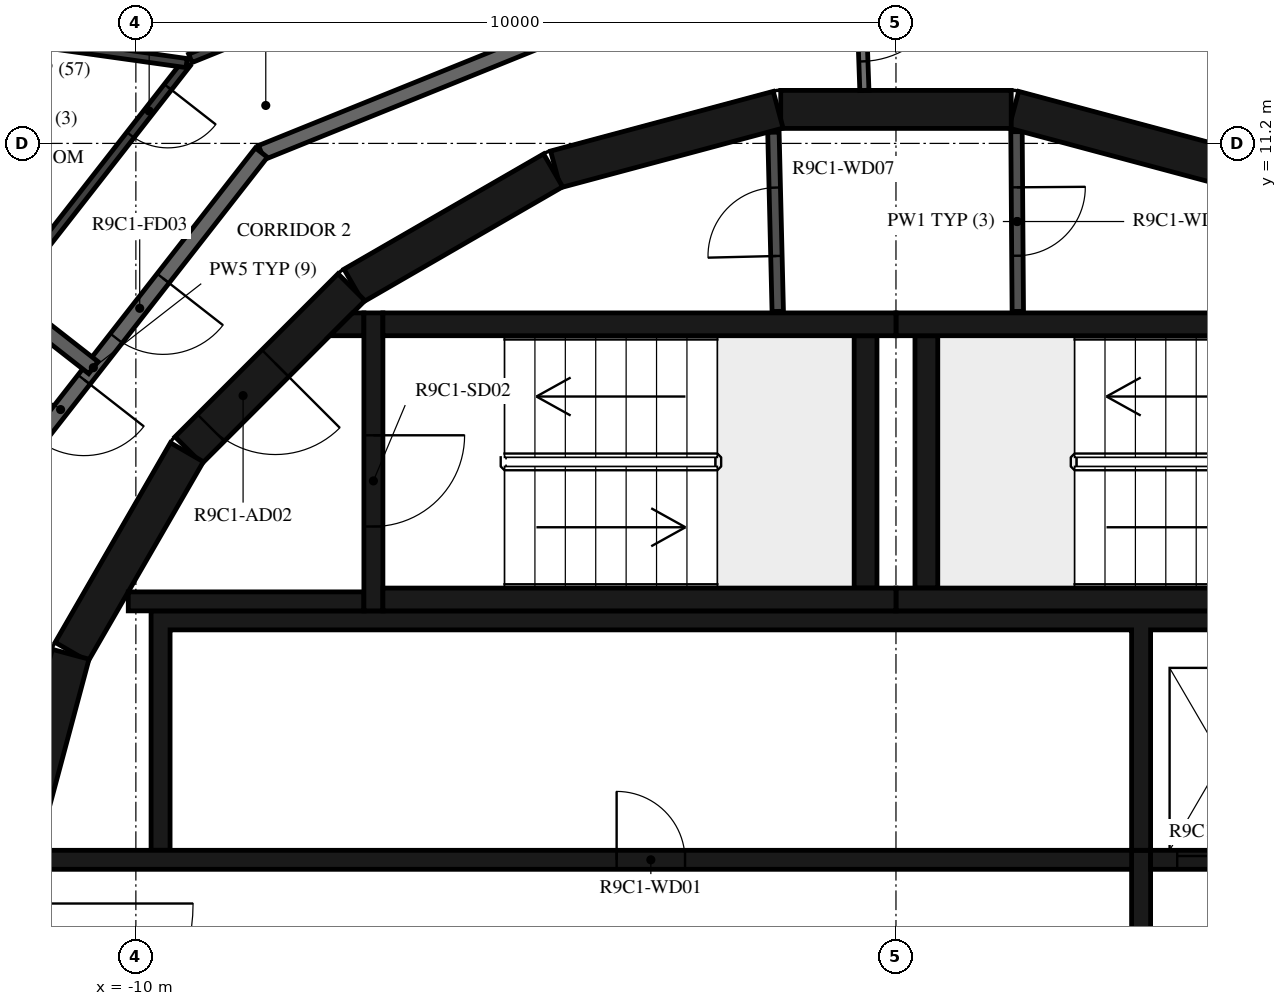
"""IFC4 building model, lengths in metres.
Left out: names, types, materials, properties, quantities, classifications, styles, units other than length and angle.
Written with IfcOpenShell. Run it as: python <this file> out.ifc"""

import sys

from ifc_helpers import new_model, si_unit, direction, frame, frame_2d, origin, place, context, subcontext, project, spatial, polyline, rectangle, outline, extrude, element, fill, save


model = new_model("IFC4")
c1 = context("Model", 3, precision=1e-05, world=origin(), true_north=direction((0.0, 1.0)))
c2 = subcontext(c1, "Body", "Model", "MODEL_VIEW")
j1 = project(units=[si_unit("LENGTHUNIT", "METRE"), si_unit("PLANEANGLEUNIT", "RADIAN")], contexts=[c1])
p1 = place(None, origin())
s1 = spatial("IfcSite", under=j1, at=p1, CompositionType="ELEMENT")
p2 = place(p1, origin())
s2 = spatial("IfcBuilding", under=s1, at=p2, CompositionType="ELEMENT")
p3 = place(p2, frame((0.0, 0.0, 357.5)))
s3 = spatial("IfcBuildingStorey", under=s2, at=p3, CompositionType="ELEMENT", Elevation=357.5)
for number, where, z_axis, x_axis in (
    (1, (4.479, 10.858, 0.0), (0.0, 0.0, 1.0), (-0.966, 0.259, 0.0)),
    (2, (1.516, 11.647, 0.0), (0.0, 0.0, 1.0), (-1.0, 0.0, 0.0)),
    (3, (-1.55, 11.643, 0.0), (0.0, 0.0, 1.0), (-0.966, -0.259, 0.0)),
    (4, (-4.51, 10.845, 0.0), (0.0, 0.0, 1.0), (-0.866, -0.5, 0.0)),
):
    element("IfcWall", number, at=place(p3, frame(where, z_axis=z_axis, x_axis=x_axis)), inside=s3, PredefinedType="SHEAR", context=c2, shape_type="SweptSolid", body=[
        extrude(rectangle(XDim=3.033, YDim=0.5, at=frame_2d((1.516, 0.0))), origin(), (0.0, 0.0, 1.0), 3.12),
    ])
p4 = place(p3, frame((-7.164, 9.308, 0.0), z_axis=(0.0, 0.0, 1.0), x_axis=(-0.707106781187, -0.707106781187, 0.0)))
e5 = element("IfcWall", 5, at=p4, inside=s3, PredefinedType="SHEAR", context=c2, shape_type="SweptSolid", body=[
    extrude(rectangle(XDim=3.032, YDim=0.5, at=frame_2d((1.516, 0.0))), origin(), (0.0, 0.0, 1.0), 3.12),
])
p5 = place(p4, frame((1.416, 0.0, 0.0)))
e6 = element("IfcOpeningElement", 6, at=p5, cuts=e5, PredefinedType="OPENING", context=c2, shape_type="SweptSolid", body=[
    extrude(rectangle(XDim=1.2, YDim=2.1, at=frame_2d((0.6, 1.05))), frame((0.0, 0.26, 0.0), z_axis=(0.0, -1.0, 0.0), x_axis=(1.0, 0.0, 0.0)), (0.0, 0.0, 1.0), 0.52),
])
for number, where, z_axis, x_axis in (
    (7, (-9.329, 7.137, 0.0), (0.0, 0.0, 1.0), (-0.5, -0.866, 0.0)),
    (8, (-10.858, 4.479, 0.0), (0.0, 0.0, 1.0), (-0.259, -0.966, 0.0)),
):
    element("IfcWall", number, at=place(p3, frame(where, z_axis=z_axis, x_axis=x_axis)), inside=s3, PredefinedType="SHEAR", context=c2, shape_type="SweptSolid", body=[
        extrude(rectangle(XDim=3.033, YDim=0.5, at=frame_2d((1.516, 0.0))), origin(), (0.0, 0.0, 1.0), 3.12),
    ])
for number, where, z_axis, x_axis in (
    (9, (0.0, 5.2, 0.0), (0.0, 0.0, 1.0), (1.0, 0.0, 0.0)),
    (10, (0.0, 8.82, 0.0), (0.0, 0.0, 1.0), (1.0, 0.0, 0.0)),
):
    element("IfcWall", number, at=place(p3, frame(where, z_axis=z_axis, x_axis=x_axis)), inside=s3, PredefinedType="SHEAR", context=c2, shape_type="SweptSolid", body=[
        extrude(rectangle(XDim=6.75, YDim=0.3, at=frame_2d((3.375, 0.0))), origin(), (0.0, 0.0, 1.0), 3.12),
    ])
p6 = place(p3, frame((0.4, 5.35, 0.0), z_axis=(0.0, 0.0, 1.0), x_axis=(0.0, 1.0, 0.0)))
e11 = element("IfcWall", 11, at=p6, inside=s3, PredefinedType="SHEAR", context=c2, shape_type="SweptSolid", body=[
    extrude(rectangle(XDim=3.32, YDim=0.3, at=frame_2d((1.66, 0.0))), origin(), (0.0, 0.0, 1.0), 3.12),
])
for number, where, z_axis, x_axis in (
    (12, (-6.75, 5.2, 0.0), (0.0, 0.0, 1.0), (1.0, 0.0, 0.0)),
    (13, (-6.75, 8.82, 0.0), (0.0, 0.0, 1.0), (1.0, 0.0, 0.0)),
):
    element("IfcWall", number, at=place(p3, frame(where, z_axis=z_axis, x_axis=x_axis)), inside=s3, PredefinedType="SHEAR", context=c2, shape_type="SweptSolid", body=[
        extrude(rectangle(XDim=6.75, YDim=0.3, at=frame_2d((3.375, 0.0))), origin(), (0.0, 0.0, 1.0), 3.12),
    ])
p7 = place(p3, frame((-0.4, 5.35, 0.0), z_axis=(0.0, 0.0, 1.0), x_axis=(0.0, 1.0, 0.0)))
e14 = element("IfcWall", 14, at=p7, inside=s3, PredefinedType="SHEAR", context=c2, shape_type="SweptSolid", body=[
    extrude(rectangle(XDim=3.32, YDim=0.3, at=frame_2d((1.66, 0.0))), origin(), (0.0, 0.0, 1.0), 3.12),
])
p8 = place(p3, frame((-6.875, 8.97, 0.0), z_axis=(0.0, 0.0, 1.0), x_axis=(0.0, -1.0, 0.0)))
e15 = element("IfcWall", 15, at=p8, inside=s3, PredefinedType="SHEAR", context=c2, shape_type="SweptSolid", body=[
    extrude(rectangle(XDim=3.92, YDim=0.25, at=frame_2d((1.96, 0.0))), origin(), (0.0, 0.0, 1.0), 3.12),
])
p9 = place(p8, frame((1.61, 0.0, 0.0)))
e16 = element("IfcOpeningElement", 16, at=p9, cuts=e15, PredefinedType="OPENING", context=c2, shape_type="SweptSolid", body=[
    extrude(rectangle(XDim=1.2, YDim=2.1, at=frame_2d((0.6, 1.05))), frame((0.0, 0.135, 0.0), z_axis=(0.0, -1.0, 0.0), x_axis=(1.0, 0.0, 0.0)), (0.0, 0.0, 1.0), 0.27),
])
p10 = place(p3, frame((-7.0, 5.175, 0.0), z_axis=(0.0, 0.0, 1.0), x_axis=(-1.0, 0.0, 0.0)))
e17 = element("IfcWall", 17, at=p10, inside=s3, PredefinedType="SHEAR", context=c2, shape_type="SweptSolid", body=[
    extrude(rectangle(XDim=3.1, YDim=0.25, at=frame_2d((1.55, 0.0))), origin(), (0.0, 0.0, 1.0), 3.12),
])
p11 = place(p3, origin())
e18 = element("IfcWall", 18, at=p11, inside=s3, PredefinedType="SHEAR", context=c2, shape_type="SweptSolid", body=[
    extrude(outline(polyline([(-7.148, 8.97), (-7.0, 8.97), (-7.0, 8.67), (-7.448, 8.67), (-7.148, 8.97)])), origin(), (0.0, 0.0, 1.0), 3.12),
])
p12 = place(p3, origin())
e19 = element("IfcWall", 19, at=p12, inside=s3, PredefinedType="SHEAR", context=c2, shape_type="SweptSolid", body=[
    extrude(outline(polyline([(-9.8, 1.9), (-9.55, 1.9), (-9.55, 4.8), (3.1, 4.8), (3.1, 1.9), (3.35, 1.9), (3.35, 4.8), (5.25, 4.8), (5.25, 1.9), (5.5, 1.9), (5.5, 4.8), (7.4, 4.8), (7.4, 1.9), (7.65, 1.9), (7.65, 4.8), (9.55, 4.8), (9.55, 1.9), (9.8, 1.9), (9.8, 4.8), (9.8, 5.05), (-9.8, 5.05), (-9.8, 4.8), (-9.8, 1.9)])), origin(), (0.0, 0.0, 1.0), 3.12),
])
p13 = place(p3, frame((-11.28, 1.775, 0.0), z_axis=(0.0, 0.0, 1.0), x_axis=(1.0, 0.0, 0.0)))
e20 = element("IfcWall", 20, at=p13, inside=s3, PredefinedType="SHEAR", context=c2, shape_type="SweptSolid", body=[
    extrude(rectangle(XDim=14.38, YDim=0.25, at=frame_2d((7.19, 0.0))), origin(), (0.0, 0.0, 1.0), 3.12),
])
p14 = place(p13, frame((7.605, 0.0, 0.0)))
e21 = element("IfcOpeningElement", 21, at=p14, cuts=e20, PredefinedType="OPENING", context=c2, shape_type="SweptSolid", body=[
    extrude(rectangle(XDim=0.9, YDim=2.1, at=frame_2d((0.45, 1.05))), frame((0.0, 0.135, 0.0), z_axis=(0.0, -1.0, 0.0), x_axis=(1.0, 0.0, 0.0)), (0.0, 0.0, 1.0), 0.27),
])
p15 = place(p3, frame((3.35, 1.775, 0.0), z_axis=(0.0, 0.0, 1.0), x_axis=(1.0, 0.0, 0.0)))
e22 = element("IfcWall", 22, at=p15, inside=s3, PredefinedType="SHEAR", context=c2, shape_type="SweptSolid", body=[
    extrude(rectangle(XDim=7.93, YDim=0.25, at=frame_2d((3.965, 0.0))), origin(), (0.0, 0.0, 1.0), 3.12),
])
p16 = place(p15, frame((0.35, 0.0, 0.0)))
e23 = element("IfcOpeningElement", 23, at=p16, cuts=e22, PredefinedType="OPENING", context=c2, shape_type="SweptSolid", body=[
    extrude(rectangle(XDim=1.2, YDim=2.4, at=frame_2d((0.6, 1.2))), frame((0.0, 0.135, 0.0), z_axis=(0.0, -1.0, 0.0), x_axis=(1.0, 0.0, 0.0)), (0.0, 0.0, 1.0), 0.27),
])
p17 = place(p15, frame((2.5, 0.0, 0.0)))
e24 = element("IfcOpeningElement", 24, at=p17, cuts=e22, PredefinedType="OPENING", context=c2, shape_type="SweptSolid", body=[
    extrude(rectangle(XDim=1.2, YDim=2.4, at=frame_2d((0.6, 1.2))), frame((0.0, 0.135, 0.0), z_axis=(0.0, -1.0, 0.0), x_axis=(1.0, 0.0, 0.0)), (0.0, 0.0, 1.0), 0.27),
])
p18 = place(p15, frame((4.8, 0.0, 0.0)))
e25 = element("IfcOpeningElement", 25, at=p18, cuts=e22, PredefinedType="OPENING", context=c2, shape_type="SweptSolid", body=[
    extrude(rectangle(XDim=0.9, YDim=2.1, at=frame_2d((0.45, 1.05))), frame((0.0, 0.135, 0.0), z_axis=(0.0, -1.0, 0.0), x_axis=(1.0, 0.0, 0.0)), (0.0, 0.0, 1.0), 0.27),
])
p19 = place(p3, frame((3.225, -1.9, 0.0), z_axis=(0.0, 0.0, 1.0), x_axis=(0.0, 1.0, 0.0)))
e26 = element("IfcWall", 26, at=p19, inside=s3, PredefinedType="SHEAR", context=c2, shape_type="SweptSolid", body=[
    extrude(rectangle(XDim=3.8, YDim=0.25, at=frame_2d((1.9, 0.0))), origin(), (0.0, 0.0, 1.0), 3.12),
])
p20 = place(p3, frame((1.586, 11.354, 0.0), z_axis=(0.0, 0.0, 1.0), x_axis=(0.007227482881, -0.999973881405, 0.0)))
e27 = element("IfcWall", 27, at=p20, inside=s3, PredefinedType="PARTITIONING", context=c2, shape_type="SweptSolid", body=[
    extrude(rectangle(XDim=2.365, YDim=0.15, at=frame_2d((1.182, 0.0))), origin(), (0.0, 0.0, 1.0), 3.12),
])
p21 = place(p20, frame((0.732, 0.0, 0.0)))
e28 = element("IfcOpeningElement", 28, at=p21, cuts=e27, PredefinedType="OPENING", context=c2, shape_type="SweptSolid", body=[
    extrude(rectangle(XDim=0.9, YDim=2.1, at=frame_2d((0.45, 1.05))), frame((0.0, 0.085, 0.0), z_axis=(0.0, -1.0, 0.0), x_axis=(1.0, 0.0, 0.0)), (0.0, 0.0, 1.0), 0.17),
])
p22 = place(p3, frame((-1.555, 8.99, 0.0), z_axis=(0.0, 0.0, 1.0), x_axis=(-0.024125549686, 0.999708936567, 0.0)))
e29 = element("IfcWall", 29, at=p22, inside=s3, PredefinedType="PARTITIONING", context=c2, shape_type="SweptSolid", body=[
    extrude(rectangle(XDim=2.358, YDim=0.15, at=frame_2d((1.179, 0.0))), origin(), (0.0, 0.0, 1.0), 3.12),
])
p23 = place(p22, frame((0.729, 0.0, 0.0)))
e30 = element("IfcOpeningElement", 30, at=p23, cuts=e29, PredefinedType="OPENING", context=c2, shape_type="SweptSolid", body=[
    extrude(rectangle(XDim=0.9, YDim=2.1, at=frame_2d((0.45, 1.05))), frame((0.0, 0.085, 0.0), z_axis=(0.0, -1.0, 0.0), x_axis=(1.0, 0.0, 0.0)), (0.0, 0.0, 1.0), 0.17),
])
p24 = place(p3, frame((-0.475, 13.598, 0.0), z_axis=(0.0, 0.0, 1.0), x_axis=(0.034852521429, -0.999392466326, 0.0)))
e31 = element("IfcWall", 31, at=p24, inside=s3, PredefinedType="PARTITIONING", context=c2, shape_type="SweptSolid", body=[
    extrude(rectangle(XDim=1.702, YDim=0.12, at=frame_2d((0.851, 0.0))), origin(), (0.0, 0.0, 1.0), 3.12),
])
p25 = place(p24, frame((0.12, 0.0, 0.0)))
e32 = element("IfcOpeningElement", 32, at=p25, cuts=e31, PredefinedType="OPENING", context=c2, shape_type="SweptSolid", body=[
    extrude(rectangle(XDim=1.2, YDim=2.1, at=frame_2d((0.6, 1.05))), frame((0.0, 0.07, 0.0), z_axis=(0.0, -1.0, 0.0), x_axis=(1.0, 0.0, 0.0)), (0.0, 0.0, 1.0), 0.14),
])
p26 = place(p3, frame((-1.691, 13.769, 0.0), z_axis=(0.0, 0.0, 1.0), x_axis=(-0.92717916932, -0.374618189599, 0.0)))
e33 = element("IfcWall", 33, at=p26, inside=s3, PredefinedType="STANDARD", context=c2, shape_type="SweptSolid", body=[
    extrude(rectangle(XDim=7.181, YDim=0.2, at=frame_2d((3.591, 0.0))), origin(), (0.0, 0.0, 1.0), 3.12),
])
p27 = place(p3, frame((-8.349, 11.079, 0.0), z_axis=(0.0, 0.0, 1.0), x_axis=(-0.615669112324, -0.78800478687, 0.0)))
e34 = element("IfcWall", 34, at=p27, inside=s3, PredefinedType="STANDARD", context=c2, shape_type="SweptSolid", body=[
    extrude(rectangle(XDim=7.181, YDim=0.2, at=frame_2d((3.591, 0.0))), origin(), (0.0, 0.0, 1.0), 3.12),
])
p28 = place(p27, frame((2.1, 0.0, 0.0)))
e35 = element("IfcOpeningElement", 35, at=p28, cuts=e34, PredefinedType="OPENING", context=c2, shape_type="SweptSolid", body=[
    extrude(rectangle(XDim=1.0, YDim=2.1, at=frame_2d((0.5, 1.05))), frame((0.0, 0.11, 0.0), z_axis=(0.0, -1.0, 0.0), x_axis=(1.0, 0.0, 0.0)), (0.0, 0.0, 1.0), 0.22),
])
p29 = place(p27, frame((3.79, 0.0, 0.0)))
e36 = element("IfcOpeningElement", 36, at=p29, cuts=e34, PredefinedType="OPENING", context=c2, shape_type="SweptSolid", body=[
    extrude(rectangle(XDim=1.0, YDim=2.1, at=frame_2d((0.5, 1.05))), frame((0.0, 0.11, 0.0), z_axis=(0.0, -1.0, 0.0), x_axis=(1.0, 0.0, 0.0)), (0.0, 0.0, 1.0), 0.22),
])
p30 = place(p3, frame((-12.479, 9.75, 0.0), z_axis=(0.0, 0.0, 1.0), x_axis=(0.788050197026, -0.615610986717, 0.0)))
e37 = element("IfcWall", 37, at=p30, inside=s3, PredefinedType="STANDARD", context=c2, shape_type="SweptSolid", body=[
    extrude(rectangle(XDim=2.437, YDim=0.2, at=frame_2d((1.218, 0.0))), origin(), (0.0, 0.0, 1.0), 3.12),
])
p31 = place(p3, frame((-6.118, 13.598, 0.0), z_axis=(0.0, 0.0, 1.0), x_axis=(-0.927163982911, -0.374655773735, 0.0)))
e38 = element("IfcWall", 38, at=p31, inside=s3, PredefinedType="PARTITIONING", context=c2, shape_type="SweptSolid", body=[
    extrude(rectangle(XDim=3.414, YDim=0.12, at=frame_2d((1.707, 0.0))), origin(), (0.0, 0.0, 1.0), 3.12),
])
p32 = place(p31, frame((0.2, 0.0, 0.0)))
e39 = element("IfcOpeningElement", 39, at=p32, cuts=e38, PredefinedType="OPENING", context=c2, shape_type="SweptSolid", body=[
    extrude(rectangle(XDim=0.9, YDim=2.1, at=frame_2d((0.45, 1.05))), frame((0.0, 0.07, 0.0), z_axis=(0.0, -1.0, 0.0), x_axis=(1.0, 0.0, 0.0)), (0.0, 0.0, 1.0), 0.14),
])
p33 = place(p3, frame((-9.333, 12.257, 0.0), z_axis=(0.0, 0.0, 1.0), x_axis=(-0.615643313808, -0.788024942602, 0.0)))
e40 = element("IfcWall", 40, at=p33, inside=s3, PredefinedType="PARTITIONING", context=c2, shape_type="SweptSolid", body=[
    extrude(rectangle(XDim=6.506, YDim=0.12, at=frame_2d((3.253, 0.0))), origin(), (0.0, 0.0, 1.0), 3.12),
])
p34 = place(p33, frame((0.4, 0.0, 0.0)))
e41 = element("IfcOpeningElement", 41, at=p34, cuts=e40, PredefinedType="OPENING", context=c2, shape_type="SweptSolid", body=[
    extrude(rectangle(XDim=0.8, YDim=2.1, at=frame_2d((0.4, 1.05))), frame((0.0, 0.07, 0.0), z_axis=(0.0, -1.0, 0.0), x_axis=(1.0, 0.0, 0.0)), (0.0, 0.0, 1.0), 0.14),
])
p35 = place(p33, frame((4.512, 0.0, 0.0)))
e42 = element("IfcOpeningElement", 42, at=p35, cuts=e40, PredefinedType="OPENING", context=c2, shape_type="SweptSolid", body=[
    extrude(rectangle(XDim=0.9, YDim=2.1, at=frame_2d((0.45, 1.05))), frame((0.0, 0.07, 0.0), z_axis=(0.0, -1.0, 0.0), x_axis=(1.0, 0.0, 0.0)), (0.0, 0.0, 1.0), 0.14),
])
p36 = place(p3, frame((-13.305, 12.815, 0.0), z_axis=(0.0, 0.0, 1.0), x_axis=(0.990267066123, -0.139180234773, 0.0)))
e43 = element("IfcWall", 43, at=p36, inside=s3, PredefinedType="PARTITIONING", context=c2, shape_type="SweptSolid", body=[
    extrude(rectangle(XDim=4.012, YDim=0.12, at=frame_2d((2.006, 0.0))), origin(), (0.0, 0.0, 1.0), 3.12),
])
p37 = place(p9, origin())
e44 = element("IfcDoor", 44, at=p37, inside=s3, OperationType="SINGLE_SWING_LEFT", PredefinedType="DOOR", context=c2, shape_type="SweptSolid", body=[
    extrude(rectangle(XDim=1.2, YDim=2.1, at=frame_2d((0.6, 1.05))), frame((0.0, 0.025, 0.0), z_axis=(0.0, -1.0, 0.0), x_axis=(1.0, 0.0, 0.0)), (0.0, 0.0, 1.0), 0.05),
])
fill(e16, e44)
p38 = place(p5, origin())
e45 = element("IfcDoor", 45, at=p38, inside=s3, OperationType="SINGLE_SWING_RIGHT", PredefinedType="DOOR", context=c2, shape_type="SweptSolid", body=[
    extrude(rectangle(XDim=1.2, YDim=2.1, at=frame_2d((0.6, 1.05))), frame((0.0, 0.025, 0.0), z_axis=(0.0, -1.0, 0.0), x_axis=(1.0, 0.0, 0.0)), (0.0, 0.0, 1.0), 0.05),
])
fill(e6, e45)
p39 = place(p16, origin())
e46 = element("IfcDoor", 46, at=p39, inside=s3, OperationType="DOUBLE_DOOR_SLIDING", PredefinedType="DOOR", context=c2, shape_type="SweptSolid", body=[
    extrude(rectangle(XDim=1.2, YDim=2.4, at=frame_2d((0.6, 1.2))), frame((0.0, 0.025, 0.0), z_axis=(0.0, -1.0, 0.0), x_axis=(1.0, 0.0, 0.0)), (0.0, 0.0, 1.0), 0.05),
])
fill(e23, e46)
p40 = place(p14, origin())
e47 = element("IfcDoor", 47, at=p40, inside=s3, OperationType="SINGLE_SWING_LEFT", PredefinedType="DOOR", context=c2, shape_type="SweptSolid", body=[
    extrude(rectangle(XDim=0.9, YDim=2.1, at=frame_2d((0.45, 1.05))), frame((0.0, 0.025, 0.0), z_axis=(0.0, -1.0, 0.0), x_axis=(1.0, 0.0, 0.0)), (0.0, 0.0, 1.0), 0.05),
])
fill(e21, e47)
p41 = place(p21, origin())
e48 = element("IfcDoor", 48, at=p41, inside=s3, OperationType="SINGLE_SWING_RIGHT", PredefinedType="DOOR", context=c2, shape_type="SweptSolid", body=[
    extrude(rectangle(XDim=0.9, YDim=2.1, at=frame_2d((0.45, 1.05))), frame((0.0, 0.025, 0.0), z_axis=(0.0, -1.0, 0.0), x_axis=(1.0, 0.0, 0.0)), (0.0, 0.0, 1.0), 0.05),
])
fill(e28, e48)
p42 = place(p23, origin())
e49 = element("IfcDoor", 49, at=p42, inside=s3, OperationType="SINGLE_SWING_LEFT", PredefinedType="DOOR", context=c2, shape_type="SweptSolid", body=[
    extrude(rectangle(XDim=0.9, YDim=2.1, at=frame_2d((0.45, 1.05))), frame((0.0, 0.025, 0.0), z_axis=(0.0, -1.0, 0.0), x_axis=(1.0, 0.0, 0.0)), (0.0, 0.0, 1.0), 0.05),
])
fill(e30, e49)
p43 = place(p28, origin())
e50 = element("IfcDoor", 50, at=p43, inside=s3, OperationType="SINGLE_SWING_RIGHT", PredefinedType="DOOR", context=c2, shape_type="SweptSolid", body=[
    extrude(rectangle(XDim=1.0, YDim=2.1, at=frame_2d((0.5, 1.05))), frame((0.0, 0.025, 0.0), z_axis=(0.0, -1.0, 0.0), x_axis=(1.0, 0.0, 0.0)), (0.0, 0.0, 1.0), 0.05),
])
fill(e35, e50)
p44 = place(p34, origin())
e51 = element("IfcDoor", 51, at=p44, inside=s3, OperationType="SINGLE_SWING_RIGHT", PredefinedType="DOOR", context=c2, shape_type="SweptSolid", body=[
    extrude(rectangle(XDim=0.8, YDim=2.1, at=frame_2d((0.4, 1.05))), frame((0.0, 0.025, 0.0), z_axis=(0.0, -1.0, 0.0), x_axis=(1.0, 0.0, 0.0)), (0.0, 0.0, 1.0), 0.05),
])
fill(e41, e51)
p45 = place(p29, origin())
e52 = element("IfcDoor", 52, at=p45, inside=s3, OperationType="SINGLE_SWING_LEFT", PredefinedType="DOOR", context=c2, shape_type="SweptSolid", body=[
    extrude(rectangle(XDim=1.0, YDim=2.1, at=frame_2d((0.5, 1.05))), frame((0.0, 0.025, 0.0), z_axis=(0.0, -1.0, 0.0), x_axis=(1.0, 0.0, 0.0)), (0.0, 0.0, 1.0), 0.05),
])
fill(e36, e52)
p46 = place(p25, origin())
e53 = element("IfcDoor", 53, at=p46, inside=s3, OperationType="DOUBLE_DOOR_SINGLE_SWING", PredefinedType="DOOR", context=c2, shape_type="SweptSolid", body=[
    extrude(rectangle(XDim=1.2, YDim=2.1, at=frame_2d((0.6, 1.05))), frame((0.0, 0.025, 0.0), z_axis=(0.0, -1.0, 0.0), x_axis=(1.0, 0.0, 0.0)), (0.0, 0.0, 1.0), 0.05),
])
fill(e32, e53)
save(model, sys.argv[1])
